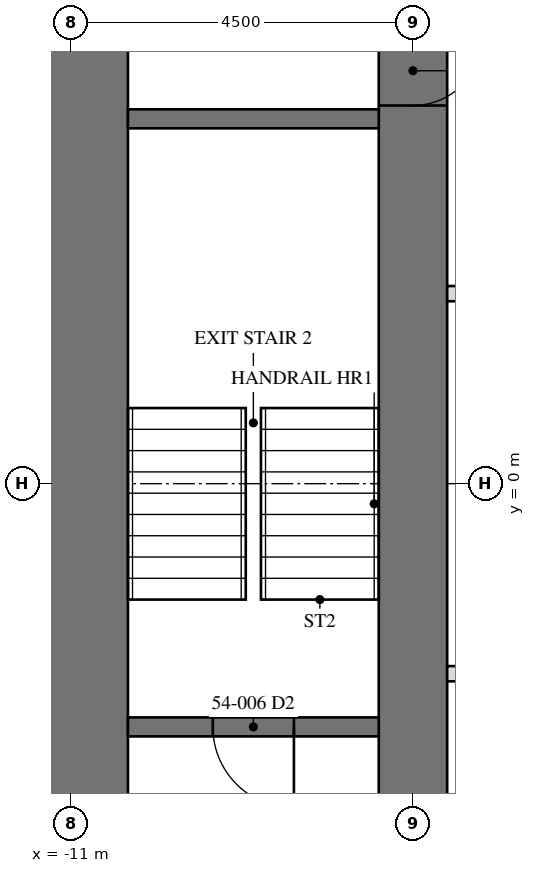
"""IFC4 building model, lengths in metres.
Left out: names, types, materials, properties, quantities, classifications, styles, units other than length and angle.
Written with IfcOpenShell. Run it as: python <this file> out.ifc"""

import sys

from ifc_helpers import new_model, si_unit, direction, frame, frame_2d, origin, place, context, subcontext, project, spatial, rectangle, extrude, element, fill, save


model = new_model("IFC4")
c1 = context("Model", 3, precision=1e-05, world=origin(), true_north=direction((0.0, 1.0)))
c2 = subcontext(c1, "Body", "Model", "MODEL_VIEW")
j1 = project(units=[si_unit("LENGTHUNIT", "METRE"), si_unit("PLANEANGLEUNIT", "RADIAN")], contexts=[c1])
p1 = place(None, origin())
s1 = spatial("IfcSite", under=j1, at=p1, CompositionType="ELEMENT")
p2 = place(p1, origin())
s2 = spatial("IfcBuilding", under=s1, at=p2, CompositionType="ELEMENT")
p3 = place(p2, frame((0.0, 0.0, 225.7)))
s3 = spatial("IfcBuildingStorey", under=s2, at=p3, CompositionType="ELEMENT", Elevation=225.7)
p4 = place(p3, frame((-11.0, 11.0, 0.0), z_axis=(0.0, 0.0, 1.0), x_axis=(0.0, -1.0, 0.0)))
e1 = element("IfcWall", 1, at=p4, inside=s3, PredefinedType="SHEAR", context=c2, shape_type="SweptSolid", body=[
    extrude(rectangle(XDim=22.0, YDim=1.5, at=frame_2d((11.0, 0.0))), origin(), (0.0, 0.0, 1.0), 3.5),
])
p5 = place(p4, frame((15.393, 0.0, 0.0)))
e2 = element("IfcOpeningElement", 2, at=p5, cuts=e1, PredefinedType="OPENING", context=c2, shape_type="SweptSolid", body=[
    extrude(rectangle(XDim=0.915, YDim=2.134, at=frame_2d((0.458, 1.067))), frame((0.0, 0.76, 0.0), z_axis=(0.0, -1.0, 0.0), x_axis=(1.0, 0.0, 0.0)), (0.0, 0.0, 1.0), 1.52),
])
p6 = place(p3, frame((-6.5, 6.5, 0.0), z_axis=(0.0, 0.0, 1.0), x_axis=(0.0, -1.0, 0.0)))
e3 = element("IfcWall", 3, at=p6, inside=s3, PredefinedType="SHEAR", context=c2, shape_type="SweptSolid", body=[
    extrude(rectangle(XDim=13.0, YDim=0.9, at=frame_2d((6.5, 0.0))), origin(), (0.0, 0.0, 1.0), 3.5),
])
p7 = place(p6, frame((10.893, 0.0, 0.0)))
e4 = element("IfcOpeningElement", 4, at=p7, cuts=e3, PredefinedType="OPENING", context=c2, shape_type="SweptSolid", body=[
    extrude(rectangle(XDim=0.915, YDim=2.134, at=frame_2d((0.458, 1.067))), frame((0.0, 0.46, 0.0), z_axis=(0.0, -1.0, 0.0), x_axis=(1.0, 0.0, 0.0)), (0.0, 0.0, 1.0), 0.92),
])
p8 = place(p6, frame((0.61, 0.0, 0.0)))
e5 = element("IfcOpeningElement", 5, at=p8, cuts=e3, PredefinedType="OPENING", context=c2, shape_type="SweptSolid", body=[
    extrude(rectangle(XDim=0.915, YDim=2.134, at=frame_2d((0.458, 1.067))), frame((0.0, 0.46, 0.0), z_axis=(0.0, -1.0, 0.0), x_axis=(1.0, 0.0, 0.0)), (0.0, 0.0, 1.0), 0.92),
])
p9 = place(p3, frame((-6.95, 4.8, 0.0), z_axis=(0.0, 0.0, 1.0), x_axis=(-1.0, 0.0, 0.0)))
e6 = element("IfcWall", 6, at=p9, inside=s3, PredefinedType="SOLIDWALL", context=c2, shape_type="SweptSolid", body=[
    extrude(rectangle(XDim=3.3, YDim=0.25, at=frame_2d((1.65, 0.0))), origin(), (0.0, 0.0, 1.0), 3.31),
])
p10 = place(p3, frame((-6.95, -3.2, 0.0), z_axis=(0.0, 0.0, 1.0), x_axis=(-1.0, 0.0, 0.0)))
e7 = element("IfcWall", 7, at=p10, inside=s3, PredefinedType="SOLIDWALL", context=c2, shape_type="SweptSolid", body=[
    extrude(rectangle(XDim=3.3, YDim=0.25, at=frame_2d((1.65, 0.0))), origin(), (0.0, 0.0, 1.0), 3.31),
])
p11 = place(p10, frame((1.116, 0.0, 0.0)))
e8 = element("IfcOpeningElement", 8, at=p11, cuts=e7, PredefinedType="OPENING", context=c2, shape_type="SweptSolid", body=[
    extrude(rectangle(XDim=1.067, YDim=2.134, at=frame_2d((0.533, 1.067))), frame((0.0, 0.135, 0.0), z_axis=(0.0, -1.0, 0.0), x_axis=(1.0, 0.0, 0.0)), (0.0, 0.0, 1.0), 0.27),
])
for number, where, z_axis, x_axis in (
    (9, (-6.05, 2.5, 0.0), (0.0, 0.0, 1.0), (1.0, 0.0, 0.0)),
    (10, (6.05, -2.5, 0.0), (0.0, 0.0, 1.0), (-1.0, 0.0, 0.0)),
):
    element("IfcWall", number, at=place(p3, frame(where, z_axis=z_axis, x_axis=x_axis)), inside=s3, PredefinedType="PARTITIONING", context=c2, shape_type="SweptSolid", body=[
        extrude(rectangle(XDim=12.1, YDim=0.2, at=frame_2d((6.05, 0.0))), origin(), (0.0, 0.0, 1.0), 3.31),
    ])
p12 = place(p11, origin())
e11 = element("IfcDoor", 11, at=p12, inside=s3, OperationType="SINGLE_SWING_LEFT", PredefinedType="DOOR", context=c2, shape_type="SweptSolid", body=[
    extrude(rectangle(XDim=1.067, YDim=2.134, at=frame_2d((0.533, 1.067))), frame((0.0, 0.025, 0.0), z_axis=(0.0, -1.0, 0.0), x_axis=(1.0, 0.0, 0.0)), (0.0, 0.0, 1.0), 0.05),
])
fill(e8, e11)
p13 = place(p8, origin())
e12 = element("IfcDoor", 12, at=p13, inside=s3, OperationType="SINGLE_SWING_RIGHT", PredefinedType="DOOR", context=c2, shape_type="SweptSolid", body=[
    extrude(rectangle(XDim=0.915, YDim=2.134, at=frame_2d((0.458, 1.067))), frame((0.0, -0.375, 0.0), z_axis=(0.0, -1.0, 0.0), x_axis=(1.0, 0.0, 0.0)), (0.0, 0.0, 1.0), 0.05),
])
fill(e5, e12)
save(model, sys.argv[1])
